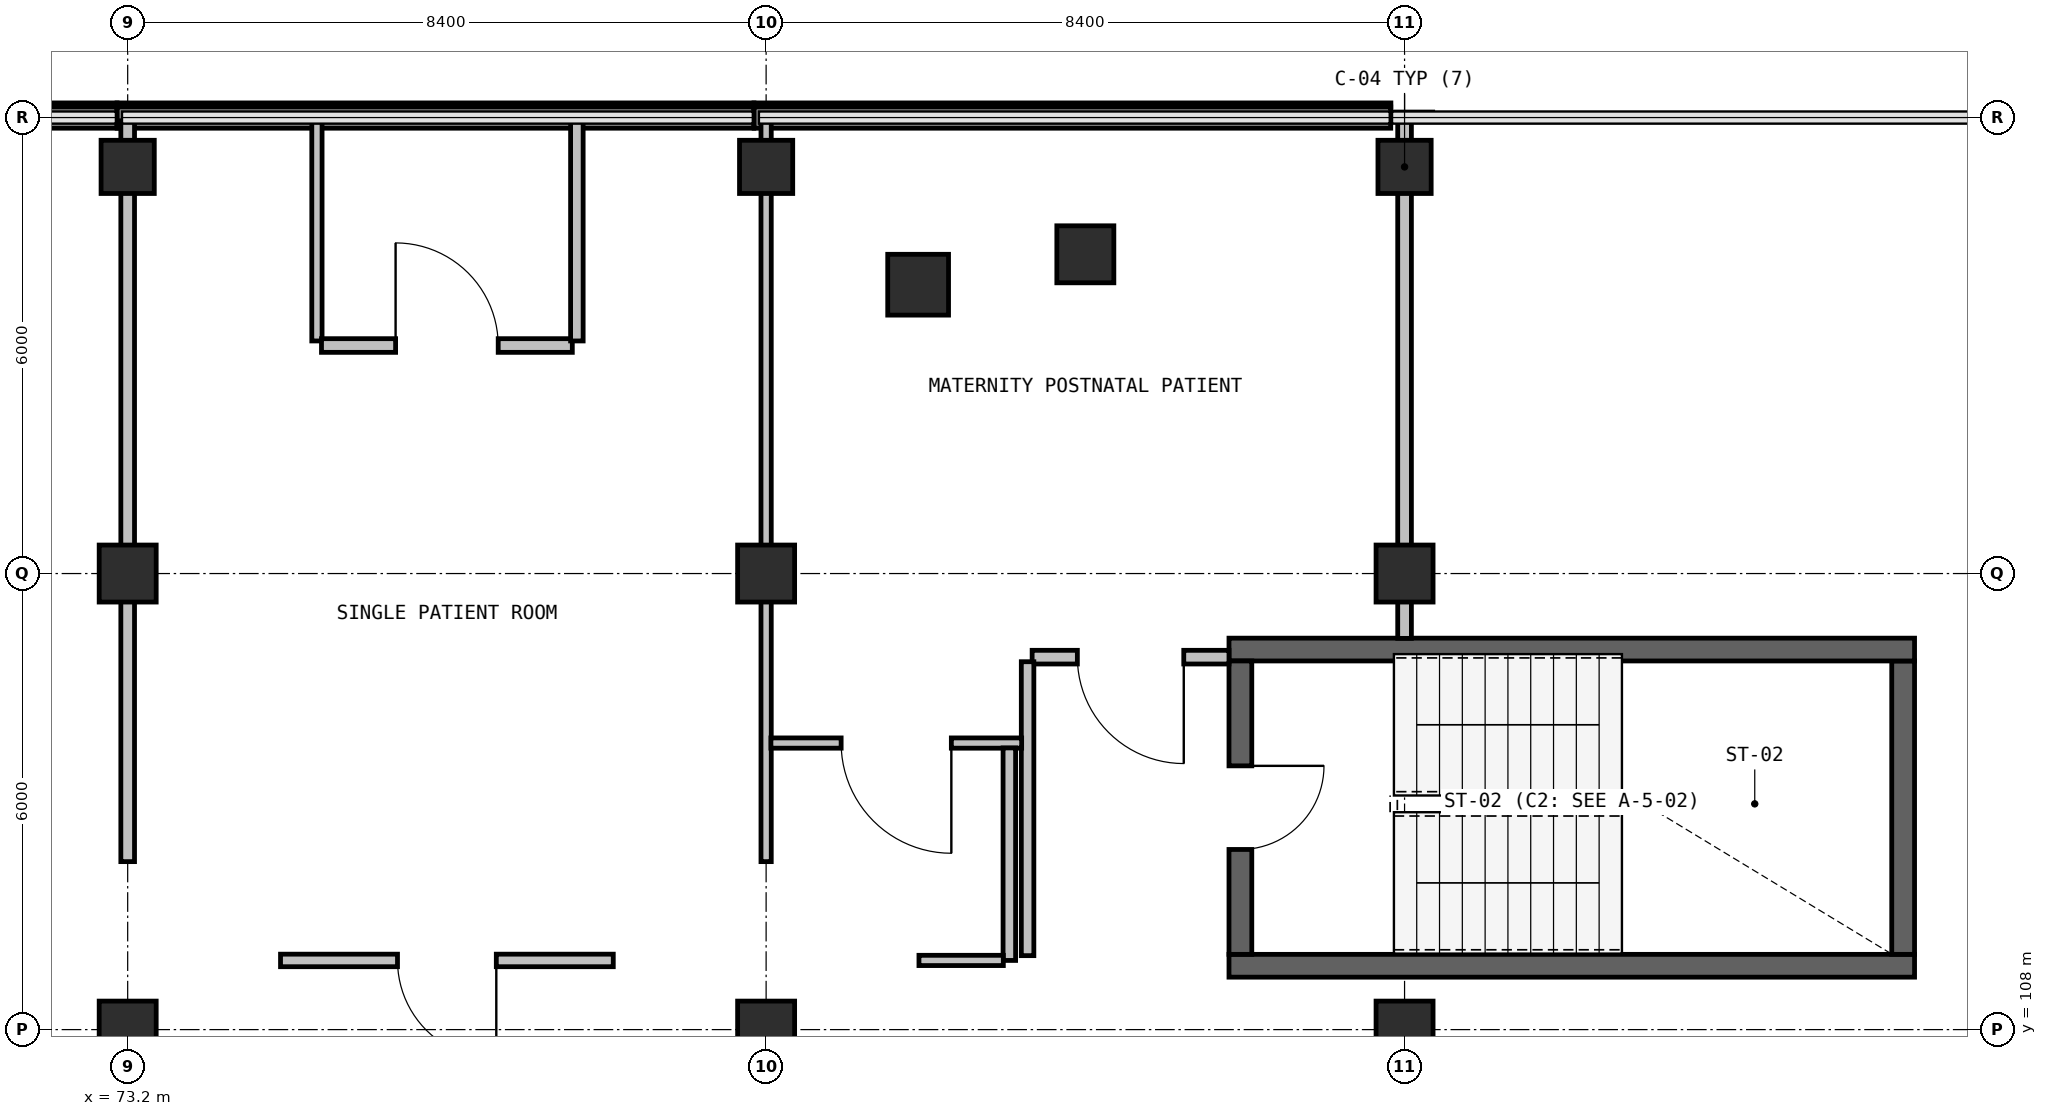
"""IFC4 building model, lengths in metres.
Left out: names, types, materials, properties, quantities, classifications, styles, units other than length and angle.
Written with IfcOpenShell. Run it as: python <this file> out.ifc"""

import sys

from ifc_helpers import new_model, si_unit, direction, frame, frame_2d, origin, origin_2d, place, context, subcontext, project, spatial, rectangle, extrude, element, fill, save


model = new_model("IFC4")
c1 = context("Model", 3, precision=1e-05, world=origin(), true_north=direction((0.0, 1.0)))
c2 = subcontext(c1, "Body", "Model", "MODEL_VIEW")
j1 = project(units=[si_unit("LENGTHUNIT", "METRE"), si_unit("PLANEANGLEUNIT", "RADIAN")], contexts=[c1])
p1 = place(None, origin())
s1 = spatial("IfcSite", under=j1, at=p1, CompositionType="ELEMENT")
p2 = place(p1, origin())
s2 = spatial("IfcBuilding", under=s1, at=p2, CompositionType="ELEMENT")
p3 = place(p2, frame((0.0, 0.0, 19.2)))
s3 = spatial("IfcBuildingStorey", under=s2, at=p3, CompositionType="ELEMENT", Elevation=19.2)
p4 = place(p3, frame((83.6, 117.8, 0.0), z_axis=(0.0, 0.0, 1.0), x_axis=(1.0, 0.0, 0.0)))
e1 = element("IfcColumn", 1, at=p4, inside=s3, PredefinedType="COLUMN", context=c2, shape_type="SweptSolid", body=[
    extrude(rectangle(XDim=0.8, YDim=0.8, at=origin_2d()), origin(), (0.0, 0.0, 1.0), 4.05),
])
for number, where, z_axis, x_axis in (
    (2, (85.8, 118.2, 0.0), (0.0, 0.0, 1.0), (1.0, 0.0, 0.0)),
    (3, (73.2, 108.0, 0.0), (0.0, 0.0, 1.0), (1.0, 0.0, 0.0)),
    (4, (73.2, 114.0, 0.0), (0.0, 0.0, 1.0), (1.0, 0.0, 0.0)),
):
    element("IfcColumn", number, at=place(p3, frame(where, z_axis=z_axis, x_axis=x_axis)), inside=s3, PredefinedType="COLUMN", context=c2, shape_type="SweptSolid", body=[
        extrude(rectangle(XDim=0.75, YDim=0.75, at=origin_2d()), origin(), (0.0, 0.0, 1.0), 4.05),
    ])
p5 = place(p3, frame((73.2, 119.35, 0.0), z_axis=(0.0, 0.0, 1.0), x_axis=(1.0, 0.0, 0.0)))
e5 = element("IfcColumn", 5, at=p5, inside=s3, PredefinedType="COLUMN", context=c2, shape_type="SweptSolid", body=[
    extrude(rectangle(XDim=0.7, YDim=0.7, at=origin_2d()), origin(), (0.0, 0.0, 1.0), 4.05),
])
for number, where, z_axis, x_axis in (
    (6, (81.6, 108.0, 0.0), (0.0, 0.0, 1.0), (1.0, 0.0, 0.0)),
    (7, (81.6, 114.0, 0.0), (0.0, 0.0, 1.0), (1.0, 0.0, 0.0)),
):
    element("IfcColumn", number, at=place(p3, frame(where, z_axis=z_axis, x_axis=x_axis)), inside=s3, PredefinedType="COLUMN", context=c2, shape_type="SweptSolid", body=[
        extrude(rectangle(XDim=0.75, YDim=0.75, at=origin_2d()), origin(), (0.0, 0.0, 1.0), 4.05),
    ])
p6 = place(p3, frame((81.6, 119.35, 0.0), z_axis=(0.0, 0.0, 1.0), x_axis=(1.0, 0.0, 0.0)))
e8 = element("IfcColumn", 8, at=p6, inside=s3, PredefinedType="COLUMN", context=c2, shape_type="SweptSolid", body=[
    extrude(rectangle(XDim=0.7, YDim=0.7, at=origin_2d()), origin(), (0.0, 0.0, 1.0), 4.05),
])
for number, where, z_axis, x_axis in (
    (9, (90.0, 108.0, 0.0), (0.0, 0.0, 1.0), (1.0, 0.0, 0.0)),
    (10, (90.0, 114.0, 0.0), (0.0, 0.0, 1.0), (1.0, 0.0, 0.0)),
):
    element("IfcColumn", number, at=place(p3, frame(where, z_axis=z_axis, x_axis=x_axis)), inside=s3, PredefinedType="COLUMN", context=c2, shape_type="SweptSolid", body=[
        extrude(rectangle(XDim=0.75, YDim=0.75, at=origin_2d()), origin(), (0.0, 0.0, 1.0), 4.05),
    ])
p7 = place(p3, frame((90.0, 119.35, 0.0), z_axis=(0.0, 0.0, 1.0), x_axis=(1.0, 0.0, 0.0)))
e11 = element("IfcColumn", 11, at=p7, inside=s3, PredefinedType="COLUMN", context=c2, shape_type="SweptSolid", body=[
    extrude(rectangle(XDim=0.7, YDim=0.7, at=origin_2d()), origin(), (0.0, 0.0, 1.0), 4.05),
])
p8 = place(p3, frame((64.682, 119.999, 0.0), z_axis=(0.0, 0.0, 1.0), x_axis=(1.0, 0.0, 0.0)))
e12 = element("IfcWall", 12, at=p8, inside=s3, PredefinedType="SOLIDWALL", context=c2, shape_type="SweptSolid", body=[
    extrude(rectangle(XDim=8.376, YDim=0.28, at=frame_2d((4.188, 0.0))), origin(), (0.0, 0.0, 1.0), 0.94),
])
p9 = place(p3, frame((73.062, 119.999, 0.0), z_axis=(0.0, 0.0, 1.0), x_axis=(1.0, 0.0, 0.0)))
e13 = element("IfcWall", 13, at=p9, inside=s3, PredefinedType="SOLIDWALL", context=c2, shape_type="SweptSolid", body=[
    extrude(rectangle(XDim=8.376, YDim=0.28, at=frame_2d((4.188, 0.0))), origin(), (0.0, 0.0, 1.0), 0.94),
])
p10 = place(p3, frame((81.442, 119.999, 0.0), z_axis=(0.0, 0.0, 1.0), x_axis=(1.0, 0.0, 0.0)))
e14 = element("IfcWall", 14, at=p10, inside=s3, PredefinedType="SOLIDWALL", context=c2, shape_type="SweptSolid", body=[
    extrude(rectangle(XDim=8.376, YDim=0.28, at=frame_2d((4.188, 0.0))), origin(), (0.0, 0.0, 1.0), 0.94),
])
p11 = place(p3, frame((87.69, 108.84, 0.0), z_axis=(0.0, 0.0, 1.0), x_axis=(1.0, 0.0, 0.0)))
e15 = element("IfcWall", 15, at=p11, inside=s3, PredefinedType="SHEAR", context=c2, shape_type="SweptSolid", body=[
    extrude(rectangle(XDim=9.02, YDim=0.3, at=frame_2d((4.51, 0.0))), origin(), (0.0, 0.0, 1.0), 3.77),
])
p12 = place(p3, frame((96.56, 108.99, 0.0), z_axis=(0.0, 0.0, 1.0), x_axis=(0.0, 1.0, 0.0)))
e16 = element("IfcWall", 16, at=p12, inside=s3, PredefinedType="SHEAR", context=c2, shape_type="SweptSolid", body=[
    extrude(rectangle(XDim=3.86, YDim=0.3, at=frame_2d((1.93, 0.0))), origin(), (0.0, 0.0, 1.0), 3.77),
])
p13 = place(p3, frame((96.71, 113.0, 0.0), z_axis=(0.0, 0.0, 1.0), x_axis=(-1.0, 0.0, 0.0)))
e17 = element("IfcWall", 17, at=p13, inside=s3, PredefinedType="SHEAR", context=c2, shape_type="SweptSolid", body=[
    extrude(rectangle(XDim=9.02, YDim=0.3, at=frame_2d((4.51, 0.0))), origin(), (0.0, 0.0, 1.0), 3.77),
])
p14 = place(p3, frame((87.84, 112.85, 0.0), z_axis=(0.0, 0.0, 1.0), x_axis=(0.0, -1.0, 0.0)))
e18 = element("IfcWall", 18, at=p14, inside=s3, PredefinedType="SHEAR", context=c2, shape_type="SweptSolid", body=[
    extrude(rectangle(XDim=3.86, YDim=0.3, at=frame_2d((1.93, 0.0))), origin(), (0.0, 0.0, 1.0), 3.77),
])
p15 = place(p14, frame((1.38, 0.0, 0.0)))
e19 = element("IfcOpeningElement", 19, at=p15, cuts=e18, PredefinedType="OPENING", context=c2, shape_type="SweptSolid", body=[
    extrude(rectangle(XDim=1.1, YDim=2.15, at=frame_2d((0.55, 1.075))), frame((0.0, 0.16, 0.0), z_axis=(0.0, -1.0, 0.0), x_axis=(1.0, 0.0, 0.0)), (0.0, 0.0, 1.0), 0.32),
])
p16 = place(p3, frame((73.2, 119.957, 0.0), z_axis=(0.0, 0.0, 1.0), x_axis=(0.0, -1.0, 0.0)))
e20 = element("IfcWall", 20, at=p16, inside=s3, PredefinedType="PARTITIONING", context=c2, shape_type="SweptSolid", body=[
    extrude(rectangle(XDim=9.747, YDim=0.18, at=frame_2d((4.874, 0.0))), origin(), (0.0, 0.0, 1.0), 3.12),
])
p17 = place(p3, frame((79.589, 108.91, 0.0), z_axis=(0.0, 0.0, 1.0), x_axis=(-1.0, 0.0, 0.0)))
e21 = element("IfcWall", 21, at=p17, inside=s3, PredefinedType="PARTITIONING", context=c2, shape_type="SweptSolid", body=[
    extrude(rectangle(XDim=4.378, YDim=0.165, at=frame_2d((2.189, 0.0))), origin(), (0.0, 0.0, 1.0), 3.77),
])
p18 = place(p17, frame((1.539, 0.0, 0.0)))
e22 = element("IfcOpeningElement", 22, at=p18, cuts=e21, PredefinedType="OPENING", context=c2, shape_type="SweptSolid", body=[
    extrude(rectangle(XDim=1.3, YDim=2.15, at=frame_2d((0.65, 1.075))), frame((0.0, 0.093, 0.0), z_axis=(0.0, -1.0, 0.0), x_axis=(1.0, 0.0, 0.0)), (0.0, 0.0, 1.0), 0.185),
])
p19 = place(p3, frame((75.69, 119.957, 0.0), z_axis=(0.0, 0.0, 1.0), x_axis=(0.0, -1.0, 0.0)))
e23 = element("IfcWall", 23, at=p19, inside=s3, PredefinedType="PARTITIONING", context=c2, shape_type="SweptSolid", body=[
    extrude(rectangle(XDim=2.897, YDim=0.135, at=frame_2d((1.448, 0.0))), origin(), (0.0, 0.0, 1.0), 3.77),
])
p20 = place(p3, frame((75.75, 117.0, 0.0), z_axis=(0.0, 0.0, 1.0), x_axis=(1.0, 0.0, 0.0)))
e24 = element("IfcWall", 24, at=p20, inside=s3, PredefinedType="PARTITIONING", context=c2, shape_type="SweptSolid", body=[
    extrude(rectangle(XDim=3.3, YDim=0.18, at=frame_2d((1.65, 0.0))), origin(), (0.0, 0.0, 1.0), 3.77),
])
p21 = place(p20, frame((0.975, 0.0, 0.0)))
e25 = element("IfcOpeningElement", 25, at=p21, cuts=e24, PredefinedType="OPENING", context=c2, shape_type="SweptSolid", body=[
    extrude(rectangle(XDim=1.35, YDim=2.15, at=frame_2d((0.675, 1.075))), frame((0.0, 0.1, 0.0), z_axis=(0.0, -1.0, 0.0), x_axis=(1.0, 0.0, 0.0)), (0.0, 0.0, 1.0), 0.2),
])
p22 = place(p3, frame((79.11, 117.06, 0.0), z_axis=(0.0, 0.0, 1.0), x_axis=(0.0, 1.0, 0.0)))
e26 = element("IfcWall", 26, at=p22, inside=s3, PredefinedType="PARTITIONING", context=c2, shape_type="SweptSolid", body=[
    extrude(rectangle(XDim=2.897, YDim=0.165, at=frame_2d((1.448, 0.0))), origin(), (0.0, 0.0, 1.0), 3.77),
])
p23 = place(p3, frame((81.6, 119.957, 0.0), z_axis=(0.0, 0.0, 1.0), x_axis=(0.0, -1.0, 0.0)))
e27 = element("IfcWall", 27, at=p23, inside=s3, PredefinedType="PARTITIONING", context=c2, shape_type="SweptSolid", body=[
    extrude(rectangle(XDim=9.747, YDim=0.135, at=frame_2d((4.874, 0.0))), origin(), (0.0, 0.0, 1.0), 3.12),
])
p24 = place(p3, frame((87.69, 112.9, 0.0), z_axis=(0.0, 0.0, 1.0), x_axis=(-1.0, 0.0, 0.0)))
e28 = element("IfcWall", 28, at=p24, inside=s3, PredefinedType="PARTITIONING", context=c2, shape_type="SweptSolid", body=[
    extrude(rectangle(XDim=2.59, YDim=0.18, at=frame_2d((1.295, 0.0))), origin(), (0.0, 0.0, 1.0), 3.77),
])
p25 = place(p24, frame((0.595, 0.0, 0.0)))
e29 = element("IfcOpeningElement", 29, at=p25, cuts=e28, PredefinedType="OPENING", context=c2, shape_type="SweptSolid", body=[
    extrude(rectangle(XDim=1.4, YDim=2.15, at=frame_2d((0.7, 1.075))), frame((0.0, 0.1, 0.0), z_axis=(0.0, -1.0, 0.0), x_axis=(1.0, 0.0, 0.0)), (0.0, 0.0, 1.0), 0.2),
])
p26 = place(p3, frame((85.04, 112.84, 0.0), z_axis=(0.0, 0.0, 1.0), x_axis=(0.0, -1.0, 0.0)))
e30 = element("IfcWall", 30, at=p26, inside=s3, PredefinedType="PARTITIONING", context=c2, shape_type="SweptSolid", body=[
    extrude(rectangle(XDim=3.867, YDim=0.165, at=frame_2d((1.934, 0.0))), origin(), (0.0, 0.0, 1.0), 3.77),
])
p27 = place(p3, frame((84.962, 111.77, 0.0), z_axis=(0.0, 0.0, 1.0), x_axis=(-1.0, 0.0, 0.0)))
e31 = element("IfcWall", 31, at=p27, inside=s3, PredefinedType="PARTITIONING", context=c2, shape_type="SweptSolid", body=[
    extrude(rectangle(XDim=3.299, YDim=0.135, at=frame_2d((1.649, 0.0))), origin(), (0.0, 0.0, 1.0), 3.77),
])
p28 = place(p27, frame((0.925, 0.0, 0.0)))
e32 = element("IfcOpeningElement", 32, at=p28, cuts=e31, PredefinedType="OPENING", context=c2, shape_type="SweptSolid", body=[
    extrude(rectangle(XDim=1.45, YDim=2.15, at=frame_2d((0.725, 1.075))), frame((0.0, 0.077, 0.0), z_axis=(0.0, -1.0, 0.0), x_axis=(1.0, 0.0, 0.0)), (0.0, 0.0, 1.0), 0.155),
])
p29 = place(p3, frame((90.0, 119.988, 0.0), z_axis=(0.0, 0.0, 1.0), x_axis=(0.0, -1.0, 0.0)))
e33 = element("IfcWall", 33, at=p29, inside=s3, PredefinedType="PARTITIONING", context=c2, shape_type="SweptSolid", body=[
    extrude(rectangle(XDim=6.841, YDim=0.18, at=frame_2d((3.42, 0.0))), origin(), (0.0, 0.0, 1.0), 3.12),
])
p30 = place(p3, frame((84.8, 111.706, 0.0), z_axis=(0.0, 0.0, 1.0), x_axis=(0.0, -1.0, 0.0)))
e34 = element("IfcWall", 34, at=p30, inside=s3, PredefinedType="PARTITIONING", context=c2, shape_type="SweptSolid", body=[
    extrude(rectangle(XDim=2.796, YDim=0.165, at=frame_2d((1.398, 0.0))), origin(), (0.0, 0.0, 1.0), 3.77),
])
p31 = place(p3, frame((84.721, 108.91, 0.0), z_axis=(0.0, 0.0, 1.0), x_axis=(-1.0, 0.0, 0.0)))
e35 = element("IfcWall", 35, at=p31, inside=s3, PredefinedType="PARTITIONING", context=c2, shape_type="SweptSolid", body=[
    extrude(rectangle(XDim=1.11, YDim=0.135, at=frame_2d((0.555, 0.0))), origin(), (0.0, 0.0, 1.0), 3.77),
])
p32 = place(p15, origin())
e36 = element("IfcDoor", 36, at=p32, inside=s3, OperationType="SINGLE_SWING_LEFT", PredefinedType="DOOR", context=c2, shape_type="SweptSolid", body=[
    extrude(rectangle(XDim=1.1, YDim=2.15, at=frame_2d((0.55, 1.075))), frame((0.0, 0.025, 0.0), z_axis=(0.0, -1.0, 0.0), x_axis=(1.0, 0.0, 0.0)), (0.0, 0.0, 1.0), 0.05),
])
fill(e19, e36)
p33 = place(p18, origin())
e37 = element("IfcDoor", 37, at=p33, inside=s3, OperationType="SINGLE_SWING_LEFT", PredefinedType="DOOR", context=c2, shape_type="SweptSolid", body=[
    extrude(rectangle(XDim=1.3, YDim=2.15, at=frame_2d((0.65, 1.075))), frame((0.0, 0.025, 0.0), z_axis=(0.0, -1.0, 0.0), x_axis=(1.0, 0.0, 0.0)), (0.0, 0.0, 1.0), 0.05),
])
fill(e22, e37)
p34 = place(p21, origin())
e38 = element("IfcDoor", 38, at=p34, inside=s3, OperationType="SINGLE_SWING_RIGHT", PredefinedType="DOOR", context=c2, shape_type="SweptSolid", body=[
    extrude(rectangle(XDim=1.35, YDim=2.15, at=frame_2d((0.675, 1.075))), frame((0.0, 0.025, 0.0), z_axis=(0.0, -1.0, 0.0), x_axis=(1.0, 0.0, 0.0)), (0.0, 0.0, 1.0), 0.05),
])
fill(e25, e38)
p35 = place(p25, origin())
e39 = element("IfcDoor", 39, at=p35, inside=s3, OperationType="SINGLE_SWING_LEFT", PredefinedType="DOOR", context=c2, shape_type="SweptSolid", body=[
    extrude(rectangle(XDim=1.4, YDim=2.15, at=frame_2d((0.7, 1.075))), frame((0.0, 0.025, 0.0), z_axis=(0.0, -1.0, 0.0), x_axis=(1.0, 0.0, 0.0)), (0.0, 0.0, 1.0), 0.05),
])
fill(e29, e39)
p36 = place(p28, origin())
e40 = element("IfcDoor", 40, at=p36, inside=s3, OperationType="SINGLE_SWING_RIGHT", PredefinedType="DOOR", context=c2, shape_type="SweptSolid", body=[
    extrude(rectangle(XDim=1.45, YDim=2.15, at=frame_2d((0.725, 1.075))), frame((0.0, 0.025, 0.0), z_axis=(0.0, -1.0, 0.0), x_axis=(1.0, 0.0, 0.0)), (0.0, 0.0, 1.0), 0.05),
])
fill(e32, e40)
save(model, sys.argv[1])
